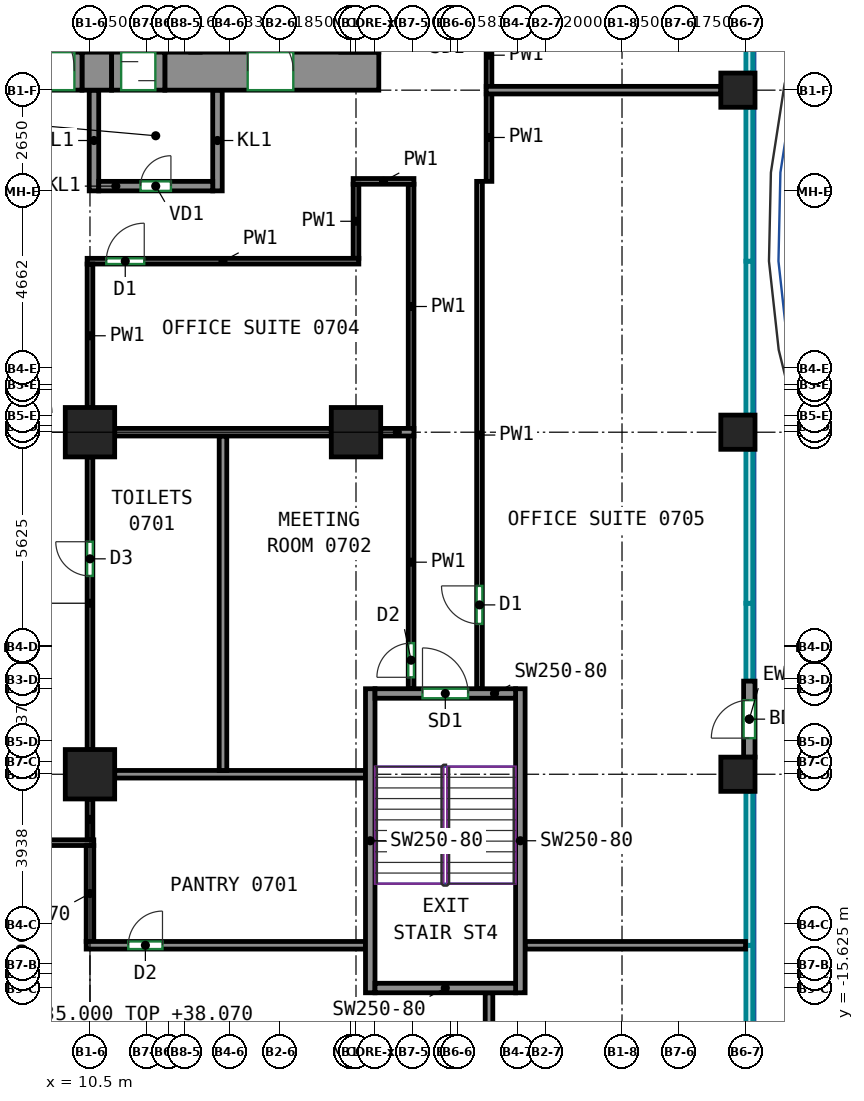
"""IFC4 building model, lengths in metres.
Left out: names, types, materials, properties, quantities, classifications, styles, units other than length and angle.
Written with IfcOpenShell. Run it as: python <this file> out.ifc"""

import sys

from ifc_helpers import new_model, si_unit, direction, frame, frame_2d, origin, origin_2d, place, context, subcontext, project, spatial, rectangle, extrude, source, transform, mapped, element, fill, save


model = new_model("IFC4")
c1 = context("Model", 3, precision=1e-05, world=origin(), true_north=direction((0.0, 1.0)))
c2 = subcontext(c1, "Body", "Model", "MODEL_VIEW")
j1 = project(units=[si_unit("LENGTHUNIT", "METRE"), si_unit("PLANEANGLEUNIT", "RADIAN")], contexts=[c1])
p1 = place(None, origin())
s1 = spatial("IfcSite", under=j1, at=p1, CompositionType="ELEMENT")
p2 = place(p1, origin())
s2 = spatial("IfcBuilding", under=s1, at=p2, CompositionType="ELEMENT")
p3 = place(p2, frame((0.0, 0.0, 35.0)))
s3 = spatial("IfcBuildingStorey", under=s2, at=p3, CompositionType="ELEMENT", Elevation=35.0)
m1 = source(origin(), c2, "Body", "SweptSolid", [
    extrude(rectangle(XDim=1.3, YDim=1.3, at=origin_2d()), origin(), (0.0, 0.0, 1.0), 3.72),
])
for number, where, z_axis, x_axis in (
    (1, (10.5, -10.0, 0.0), (0.0, 0.0, 1.0), (1.0, 0.0, 0.0)),
    (2, (10.5, -1.0, 0.0), (0.0, 0.0, 1.0), (1.0, 0.0, 0.0)),
    (3, (17.5, -1.0, 0.0), (0.0, 0.0, 1.0), (1.0, 0.0, 0.0)),
):
    element("IfcColumn", number, at=place(p3, frame(where, z_axis=z_axis, x_axis=x_axis)), inside=s3, PredefinedType="COLUMN", context=c2, shape_type="MappedRepresentation", body=[
        mapped(m1, transform((0.0, 0.0, 0.0))),
    ])
m2 = source(origin(), c2, "Body", "SweptSolid", [
    extrude(rectangle(XDim=0.9, YDim=0.9, at=origin_2d()), origin(), (0.0, 0.0, 1.0), 3.72),
])
for number, where, z_axis, x_axis in (
    (4, (27.55, -10.0, 0.0), (0.0, 0.0, 1.0), (1.0, 0.0, 0.0)),
    (5, (27.55, -1.0, 0.0), (0.0, 0.0, 1.0), (1.0, 0.0, 0.0)),
    (6, (27.55, 8.0, 0.0), (0.0, 0.0, 1.0), (1.0, 0.0, 0.0)),
):
    element("IfcColumn", number, at=place(p3, frame(where, z_axis=z_axis, x_axis=x_axis)), inside=s3, PredefinedType="COLUMN", context=c2, shape_type="MappedRepresentation", body=[
        mapped(m2, transform((0.0, 0.0, 0.0))),
    ])
m3 = source(origin(), c2, "Body", "SweptSolid", [
    extrude(rectangle(XDim=0.78, YDim=1.0, at=frame_2d((0.39, 0.0))), origin(), (0.0, 0.0, 1.0), 3.72),
])
p4 = place(p3, frame((10.29, 8.5, 0.0), z_axis=(0.0, 0.0, 1.0), x_axis=(1.0, 0.0, 0.0)))
e7 = element("IfcWall", 7, at=p4, inside=s3, PredefinedType="SHEAR", context=c2, shape_type="MappedRepresentation", body=[
    mapped(m3, transform((0.0, 0.0, 0.0))),
])
m4 = source(origin(), c2, "Body", "SweptSolid", [
    extrude(rectangle(XDim=5.63, YDim=1.0, at=frame_2d((2.815, 0.0))), origin(), (0.0, 0.0, 1.0), 3.72),
])
p5 = place(p3, frame((12.47, 8.5, 0.0), z_axis=(0.0, 0.0, 1.0), x_axis=(1.0, 0.0, 0.0)))
e8 = element("IfcWall", 8, at=p5, inside=s3, PredefinedType="SHEAR", context=c2, shape_type="MappedRepresentation", body=[
    mapped(m4, transform((0.0, 0.0, 0.0))),
])
p6 = place(p5, frame((2.18, 0.0, 0.0)))
e9 = element("IfcOpeningElement", 9, at=p6, cuts=e8, PredefinedType="OPENING", context=c2, shape_type="SweptSolid", body=[
    extrude(rectangle(XDim=1.2, YDim=2.1, at=frame_2d((0.6, 1.05))), frame((0.0, 0.51, 0.0), z_axis=(0.0, -1.0, 0.0), x_axis=(1.0, 0.0, 0.0)), (0.0, 0.0, 1.0), 1.02),
])
m5 = source(origin(), c2, "Body", "SweptSolid", [
    extrude(rectangle(XDim=8.0, YDim=0.25, at=frame_2d((4.0, 0.0))), origin(), (0.0, 0.0, 1.0), 3.72),
])
for number, where, z_axis, x_axis in (
    (10, (17.875, -15.75, 0.0), (0.0, 0.0, 1.0), (0.0, 1.0, 0.0)),
    (11, (21.825, -15.75, 0.0), (0.0, 0.0, 1.0), (0.0, 1.0, 0.0)),
):
    element("IfcWall", number, at=place(p3, frame(where, z_axis=z_axis, x_axis=x_axis)), inside=s3, PredefinedType="SHEAR", context=c2, shape_type="MappedRepresentation", body=[
        mapped(m5, transform((0.0, 0.0, 0.0))),
    ])
m6 = source(origin(), c2, "Body", "SweptSolid", [
    extrude(rectangle(XDim=3.7, YDim=0.25, at=frame_2d((1.85, 0.0))), origin(), (0.0, 0.0, 1.0), 3.72),
])
p7 = place(p3, frame((18.0, -15.625, 0.0), z_axis=(0.0, 0.0, 1.0), x_axis=(1.0, 0.0, 0.0)))
e12 = element("IfcWall", 12, at=p7, inside=s3, PredefinedType="SHEAR", context=c2, shape_type="MappedRepresentation", body=[
    mapped(m6, transform((0.0, 0.0, 0.0))),
])
p8 = place(p3, frame((18.0, -7.875, 0.0), z_axis=(0.0, 0.0, 1.0), x_axis=(1.0, 0.0, 0.0)))
e13 = element("IfcWall", 13, at=p8, inside=s3, PredefinedType="SHEAR", context=c2, shape_type="MappedRepresentation", body=[
    mapped(m6, transform((0.0, 0.0, 0.0))),
])
p9 = place(p8, frame((1.25, 0.0, 0.0)))
e14 = element("IfcOpeningElement", 14, at=p9, cuts=e13, PredefinedType="OPENING", context=c2, shape_type="SweptSolid", body=[
    extrude(rectangle(XDim=1.2, YDim=2.1, at=frame_2d((0.6, 1.05))), frame((0.0, 0.135, 0.0), z_axis=(0.0, -1.0, 0.0), x_axis=(1.0, 0.0, 0.0)), (0.0, 0.0, 1.0), 0.27),
])
m7 = source(origin(), c2, "Body", "SweptSolid", [
    extrude(rectangle(XDim=2.0, YDim=0.3, at=frame_2d((1.0, 0.0))), origin(), (0.0, 0.0, 1.0), 3.72),
])
p10 = place(p3, frame((27.85, -9.55, 0.0), z_axis=(0.0, 0.0, 1.0), x_axis=(0.0, 1.0, 0.0)))
e15 = element("IfcWall", 15, at=p10, inside=s3, PredefinedType="SOLIDWALL", context=c2, shape_type="MappedRepresentation", body=[
    mapped(m7, transform((0.0, 0.0, 0.0))),
])
p11 = place(p10, frame((0.5, 0.0, 0.0)))
e16 = element("IfcOpeningElement", 16, at=p11, cuts=e15, PredefinedType="OPENING", context=c2, shape_type="SweptSolid", body=[
    extrude(rectangle(XDim=1.0, YDim=2.1, at=frame_2d((0.5, 1.05))), frame((0.0, 0.16, 0.0), z_axis=(0.0, -1.0, 0.0), x_axis=(1.0, 0.0, 0.0)), (0.0, 0.0, 1.0), 0.32),
])
m8 = source(origin(), c2, "Body", "SweptSolid", [
    extrude(rectangle(XDim=2.65, YDim=0.25, at=frame_2d((1.325, 0.0))), origin(), (0.0, 0.0, 1.0), 3.72),
])
for number, where, z_axis, x_axis in (
    (17, (10.605, 5.35, 0.0), (0.0, 0.0, 1.0), (0.0, 1.0, 0.0)),
    (18, (13.855, 5.35, 0.0), (0.0, 0.0, 1.0), (0.0, 1.0, 0.0)),
):
    element("IfcWall", number, at=place(p3, frame(where, z_axis=z_axis, x_axis=x_axis)), inside=s3, PredefinedType="PARTITIONING", context=c2, shape_type="MappedRepresentation", body=[
        mapped(m8, transform((0.0, 0.0, 0.0))),
    ])
m9 = source(origin(), c2, "Body", "SweptSolid", [
    extrude(rectangle(XDim=3.0, YDim=0.25, at=frame_2d((1.5, 0.0))), origin(), (0.0, 0.0, 1.0), 3.72),
])
p12 = place(p3, frame((10.73, 5.475, 0.0), z_axis=(0.0, 0.0, 1.0), x_axis=(1.0, 0.0, 0.0)))
e19 = element("IfcWall", 19, at=p12, inside=s3, PredefinedType="PARTITIONING", context=c2, shape_type="MappedRepresentation", body=[
    mapped(m9, transform((0.0, 0.0, 0.0))),
])
p13 = place(p12, frame((1.1, 0.0, 0.0)))
e20 = element("IfcOpeningElement", 20, at=p13, cuts=e19, PredefinedType="OPENING", context=c2, shape_type="SweptSolid", body=[
    extrude(rectangle(XDim=0.8, YDim=2.0, at=frame_2d((0.4, 1.0))), frame((0.0, 0.135, 0.0), z_axis=(0.0, -1.0, 0.0), x_axis=(1.0, 0.0, 0.0)), (0.0, 0.0, 1.0), 0.27),
])
m10 = source(origin(), c2, "Body", "SweptSolid", [
    extrude(rectangle(XDim=2.4, YDim=1.0, at=frame_2d((1.2, 0.0))), origin(), (0.0, 0.0, 1.0), 2.7),
])
p14 = place(p3, frame((7.89, 8.5, 0.0), z_axis=(0.0, 0.0, 1.0), x_axis=(1.0, 0.0, 0.0)))
e21 = element("IfcWall", 21, at=p14, inside=s3, PredefinedType="PARTITIONING", context=c2, shape_type="MappedRepresentation", body=[
    mapped(m10, transform((0.0, 0.0, 0.0))),
])
p15 = place(p14, frame((0.2, 0.0, 0.0)))
e22 = element("IfcOpeningElement", 22, at=p15, cuts=e21, PredefinedType="OPENING", context=c2, shape_type="SweptSolid", body=[
    extrude(rectangle(XDim=2.0, YDim=2.1, at=frame_2d((1.0, 1.05))), frame((0.0, 0.51, 0.0), z_axis=(0.0, -1.0, 0.0), x_axis=(1.0, 0.0, 0.0)), (0.0, 0.0, 1.0), 1.02),
])
m11 = source(origin(), c2, "Body", "SweptSolid", [
    extrude(rectangle(XDim=1.4, YDim=1.0, at=frame_2d((0.7, 0.0))), origin(), (0.0, 0.0, 1.0), 2.7),
])
p16 = place(p3, frame((11.07, 8.5, 0.0), z_axis=(0.0, 0.0, 1.0), x_axis=(1.0, 0.0, 0.0)))
e23 = element("IfcWall", 23, at=p16, inside=s3, PredefinedType="PARTITIONING", context=c2, shape_type="MappedRepresentation", body=[
    mapped(m11, transform((0.0, 0.0, 0.0))),
])
p17 = place(p16, frame((0.25, 0.0, 0.0)))
e24 = element("IfcOpeningElement", 24, at=p17, cuts=e23, PredefinedType="OPENING", context=c2, shape_type="SweptSolid", body=[
    extrude(rectangle(XDim=0.9, YDim=2.1, at=frame_2d((0.45, 1.05))), frame((0.0, 0.51, 0.0), z_axis=(0.0, -1.0, 0.0), x_axis=(1.0, 0.0, 0.0)), (0.0, 0.0, 1.0), 1.02),
])
p18 = place(p3, frame((-10.575, -11.8, 0.0), z_axis=(0.0, 0.0, 1.0), x_axis=(1.0, 0.0, 0.0)))
e25 = element("IfcWall", 25, at=p18, inside=s3, PredefinedType="PARTITIONING", context=c2, shape_type="SweptSolid", body=[
    extrude(rectangle(XDim=21.175, YDim=0.15, at=frame_2d((10.587, 0.0))), origin(), (0.0, 0.0, 1.0), 3.72),
])
p19 = place(p18, frame((2.018, 0.0, 0.0)))
e26 = element("IfcOpeningElement", 26, at=p19, cuts=e25, PredefinedType="OPENING", context=c2, shape_type="SweptSolid", body=[
    extrude(rectangle(XDim=1.8, YDim=2.1, at=frame_2d((0.9, 1.05))), frame((0.0, 0.085, 0.0), z_axis=(0.0, -1.0, 0.0), x_axis=(1.0, 0.0, 0.0)), (0.0, 0.0, 1.0), 0.17),
])
p20 = place(p18, frame((12.467, 0.0, 0.0)))
e27 = element("IfcOpeningElement", 27, at=p20, cuts=e25, PredefinedType="OPENING", context=c2, shape_type="SweptSolid", body=[
    extrude(rectangle(XDim=0.9, YDim=2.1, at=frame_2d((0.45, 1.05))), frame((0.0, 0.085, 0.0), z_axis=(0.0, -1.0, 0.0), x_axis=(1.0, 0.0, 0.0)), (0.0, 0.0, 1.0), 0.17),
])
p21 = place(p3, frame((10.5, -11.725, 0.0), z_axis=(0.0, 0.0, 1.0), x_axis=(0.0, 1.0, 0.0)))
e28 = element("IfcWall", 28, at=p21, inside=s3, PredefinedType="PARTITIONING", context=c2, shape_type="SweptSolid", body=[
    extrude(rectangle(XDim=1.075, YDim=0.15, at=frame_2d((0.538, 0.0))), origin(), (0.0, 0.0, 1.0), 3.07),
])
p22 = place(p3, frame((10.5, -9.35, 0.0), z_axis=(0.0, 0.0, 1.0), x_axis=(0.0, 1.0, 0.0)))
e29 = element("IfcWall", 29, at=p22, inside=s3, PredefinedType="PARTITIONING", context=c2, shape_type="SweptSolid", body=[
    extrude(rectangle(XDim=7.7, YDim=0.15, at=frame_2d((3.85, 0.0))), origin(), (0.0, 0.0, 1.0), 3.07),
])
p23 = place(p22, frame((4.568, 0.0, 0.0)))
e30 = element("IfcOpeningElement", 30, at=p23, cuts=e29, PredefinedType="OPENING", context=c2, shape_type="SweptSolid", body=[
    extrude(rectangle(XDim=0.9, YDim=2.1, at=frame_2d((0.45, 1.05))), frame((0.0, 0.085, 0.0), z_axis=(0.0, -1.0, 0.0), x_axis=(1.0, 0.0, 0.0)), (0.0, 0.0, 1.0), 0.17),
])
p24 = place(p3, frame((18.95, -7.75, 0.0), z_axis=(0.0, 0.0, 1.0), x_axis=(0.0, 1.0, 0.0)))
e31 = element("IfcWall", 31, at=p24, inside=s3, PredefinedType="PARTITIONING", context=c2, shape_type="SweptSolid", body=[
    extrude(rectangle(XDim=6.66, YDim=0.15, at=frame_2d((3.33, 0.0))), origin(), (0.0, 0.0, 1.0), 3.72),
])
p25 = place(p24, frame((0.301, 0.0, 0.0)))
e32 = element("IfcOpeningElement", 32, at=p25, cuts=e31, PredefinedType="OPENING", context=c2, shape_type="SweptSolid", body=[
    extrude(rectangle(XDim=0.9, YDim=2.1, at=frame_2d((0.45, 1.05))), frame((0.0, 0.085, 0.0), z_axis=(0.0, -1.0, 0.0), x_axis=(1.0, 0.0, 0.0)), (0.0, 0.0, 1.0), 0.17),
])
p26 = place(p3, frame((18.95, -0.91, 0.0), z_axis=(0.0, 0.0, 1.0), x_axis=(0.0, 1.0, 0.0)))
e33 = element("IfcWall", 33, at=p26, inside=s3, PredefinedType="PARTITIONING", context=c2, shape_type="SweptSolid", body=[
    extrude(rectangle(XDim=6.435, YDim=0.15, at=frame_2d((3.217, 0.0))), origin(), (0.0, 0.0, 1.0), 3.72),
])
p27 = place(p3, frame((17.425, 5.6, 0.0), z_axis=(0.0, 0.0, 1.0), x_axis=(1.0, 0.0, 0.0)))
e34 = element("IfcWall", 34, at=p27, inside=s3, PredefinedType="PARTITIONING", context=c2, shape_type="SweptSolid", body=[
    extrude(rectangle(XDim=1.6, YDim=0.15, at=frame_2d((0.8, 0.0))), origin(), (0.0, 0.0, 1.0), 3.72),
])
p28 = place(p3, frame((17.5, 3.575, 0.0), z_axis=(0.0, 0.0, 1.0), x_axis=(0.0, 1.0, 0.0)))
e35 = element("IfcWall", 35, at=p28, inside=s3, PredefinedType="PARTITIONING", context=c2, shape_type="SweptSolid", body=[
    extrude(rectangle(XDim=1.95, YDim=0.15, at=frame_2d((0.975, 0.0))), origin(), (0.0, 0.0, 1.0), 3.72),
])
p29 = place(p3, frame((10.425, 3.5, 0.0), z_axis=(0.0, 0.0, 1.0), x_axis=(1.0, 0.0, 0.0)))
e36 = element("IfcWall", 36, at=p29, inside=s3, PredefinedType="PARTITIONING", context=c2, shape_type="SweptSolid", body=[
    extrude(rectangle(XDim=7.15, YDim=0.15, at=frame_2d((3.575, 0.0))), origin(), (0.0, 0.0, 1.0), 3.72),
])
p30 = place(p29, frame((0.503, 0.0, 0.0)))
e37 = element("IfcOpeningElement", 37, at=p30, cuts=e36, PredefinedType="OPENING", context=c2, shape_type="SweptSolid", body=[
    extrude(rectangle(XDim=1.0, YDim=2.1, at=frame_2d((0.5, 1.05))), frame((0.0, 0.085, 0.0), z_axis=(0.0, -1.0, 0.0), x_axis=(1.0, 0.0, 0.0)), (0.0, 0.0, 1.0), 0.17),
])
p31 = place(p3, frame((10.5, -0.35, 0.0), z_axis=(0.0, 0.0, 1.0), x_axis=(0.0, 1.0, 0.0)))
e38 = element("IfcWall", 38, at=p31, inside=s3, PredefinedType="PARTITIONING", context=c2, shape_type="SweptSolid", body=[
    extrude(rectangle(XDim=3.775, YDim=0.15, at=frame_2d((1.888, 0.0))), origin(), (0.0, 0.0, 1.0), 3.72),
])
p32 = place(p3, frame((21.0, 5.6, 0.0), z_axis=(0.0, 0.0, 1.0), x_axis=(0.0, 1.0, 0.0)))
e39 = element("IfcWall", 39, at=p32, inside=s3, PredefinedType="PARTITIONING", context=c2, shape_type="SweptSolid", body=[
    extrude(rectangle(XDim=2.31, YDim=0.15, at=frame_2d((1.155, 0.0))), origin(), (0.0, 0.0, 1.0), 3.72),
])
p33 = place(p3, frame((20.75, -7.75, 0.0), z_axis=(0.0, 0.0, 1.0), x_axis=(0.0, 1.0, 0.0)))
e40 = element("IfcWall", 40, at=p33, inside=s3, PredefinedType="PARTITIONING", context=c2, shape_type="SweptSolid", body=[
    extrude(rectangle(XDim=13.35, YDim=0.15, at=frame_2d((6.675, 0.0))), origin(), (0.0, 0.0, 1.0), 3.72),
])
p34 = place(p33, frame((1.706, 0.0, 0.0)))
e41 = element("IfcOpeningElement", 41, at=p34, cuts=e40, PredefinedType="OPENING", context=c2, shape_type="SweptSolid", body=[
    extrude(rectangle(XDim=1.0, YDim=2.1, at=frame_2d((0.5, 1.05))), frame((0.0, 0.085, 0.0), z_axis=(0.0, -1.0, 0.0), x_axis=(1.0, 0.0, 0.0)), (0.0, 0.0, 1.0), 0.17),
])
p35 = place(p3, frame((21.0, 8.09, 0.0), z_axis=(0.0, 0.0, 1.0), x_axis=(0.0, 1.0, 0.0)))
e42 = element("IfcWall", 42, at=p35, inside=s3, PredefinedType="PARTITIONING", context=c2, shape_type="SweptSolid", body=[
    extrude(rectangle(XDim=1.66, YDim=0.15, at=frame_2d((0.83, 0.0))), origin(), (0.0, 0.0, 1.0), 3.72),
])
p36 = place(p3, frame((21.0, -15.75, 0.0), z_axis=(0.0, 0.0, 1.0), x_axis=(0.0, -1.0, 0.0)))
e43 = element("IfcWall", 43, at=p36, inside=s3, PredefinedType="PARTITIONING", context=c2, shape_type="SweptSolid", body=[
    extrude(rectangle(XDim=3.15, YDim=0.2, at=frame_2d((1.575, 0.0))), origin(), (0.0, 0.0, 1.0), 3.72),
])
p37 = place(p3, frame((21.95, -14.5, 0.0), z_axis=(0.0, 0.0, 1.0), x_axis=(1.0, 0.0, 0.0)))
e44 = element("IfcWall", 44, at=p37, inside=s3, PredefinedType="PARTITIONING", context=c2, shape_type="SweptSolid", body=[
    extrude(rectangle(XDim=5.8, YDim=0.2, at=frame_2d((2.9, 0.0))), origin(), (0.0, 0.0, 1.0), 3.72),
])
p38 = place(p3, frame((10.5, -14.4, 0.0), z_axis=(0.0, 0.0, 1.0), x_axis=(0.0, 1.0, 0.0)))
e45 = element("IfcWall", 45, at=p38, inside=s3, PredefinedType="PARTITIONING", context=c2, shape_type="SweptSolid", body=[
    extrude(rectangle(XDim=2.524, YDim=0.2, at=frame_2d((1.262, 0.0))), origin(), (0.0, 0.0, 1.0), 3.07),
])
p39 = place(p3, frame((10.4, -14.5, 0.0), z_axis=(0.0, 0.0, 1.0), x_axis=(1.0, 0.0, 0.0)))
e46 = element("IfcWall", 46, at=p39, inside=s3, PredefinedType="PARTITIONING", context=c2, shape_type="SweptSolid", body=[
    extrude(rectangle(XDim=7.35, YDim=0.2, at=frame_2d((3.675, 0.0))), origin(), (0.0, 0.0, 1.0), 3.72),
])
p40 = place(p39, frame((1.108, 0.0, 0.0)))
e47 = element("IfcOpeningElement", 47, at=p40, cuts=e46, PredefinedType="OPENING", context=c2, shape_type="SweptSolid", body=[
    extrude(rectangle(XDim=0.9, YDim=2.1, at=frame_2d((0.45, 1.05))), frame((0.0, 0.11, 0.0), z_axis=(0.0, -1.0, 0.0), x_axis=(1.0, 0.0, 0.0)), (0.0, 0.0, 1.0), 0.22),
])
p41 = place(p3, frame((11.15, -10.0, 0.0), z_axis=(0.0, 0.0, 1.0), x_axis=(1.0, 0.0, 0.0)))
e48 = element("IfcWall", 48, at=p41, inside=s3, PredefinedType="PARTITIONING", context=c2, shape_type="SweptSolid", body=[
    extrude(rectangle(XDim=6.6, YDim=0.2, at=frame_2d((3.3, 0.0))), origin(), (0.0, 0.0, 1.0), 3.72),
])
p42 = place(p3, frame((14.0, -9.9, 0.0), z_axis=(0.0, 0.0, 1.0), x_axis=(0.0, 1.0, 0.0)))
e49 = element("IfcWall", 49, at=p42, inside=s3, PredefinedType="PARTITIONING", context=c2, shape_type="SweptSolid", body=[
    extrude(rectangle(XDim=8.8, YDim=0.2, at=frame_2d((4.4, 0.0))), origin(), (0.0, 0.0, 1.0), 3.72),
])
p43 = place(p3, frame((11.15, -1.0, 0.0), z_axis=(0.0, 0.0, 1.0), x_axis=(1.0, 0.0, 0.0)))
e50 = element("IfcWall", 50, at=p43, inside=s3, PredefinedType="PARTITIONING", context=c2, shape_type="SweptSolid", body=[
    extrude(rectangle(XDim=5.7, YDim=0.2, at=frame_2d((2.85, 0.0))), origin(), (0.0, 0.0, 1.0), 3.72),
])
p44 = place(p3, frame((18.15, -1.0, 0.0), z_axis=(0.0, 0.0, 1.0), x_axis=(1.0, 0.0, 0.0)))
e51 = element("IfcWall", 51, at=p44, inside=s3, PredefinedType="PARTITIONING", context=c2, shape_type="SweptSolid", body=[
    extrude(rectangle(XDim=0.874, YDim=0.2, at=frame_2d((0.437, 0.0))), origin(), (0.0, 0.0, 1.0), 3.07),
])
p45 = place(p3, frame((20.926, 8.0, 0.0), z_axis=(0.0, 0.0, 1.0), x_axis=(1.0, 0.0, 0.0)))
e52 = element("IfcWall", 52, at=p45, inside=s3, PredefinedType="PARTITIONING", context=c2, shape_type="SweptSolid", body=[
    extrude(rectangle(XDim=6.174, YDim=0.2, at=frame_2d((3.087, 0.0))), origin(), (0.0, 0.0, 1.0), 3.72),
])
p46 = place(p11, origin())
e53 = element("IfcDoor", 53, at=p46, inside=s3, OperationType="SINGLE_SWING_LEFT", PredefinedType="DOOR", context=c2, shape_type="SweptSolid", body=[
    extrude(rectangle(XDim=1.0, YDim=2.1, at=frame_2d((0.5, 1.05))), frame((0.0, 0.025, 0.0), z_axis=(0.0, -1.0, 0.0), x_axis=(1.0, 0.0, 0.0)), (0.0, 0.0, 1.0), 0.05),
])
fill(e16, e53)
p47 = place(p15, origin())
e54 = element("IfcDoor", 54, at=p47, inside=s3, OperationType="DOUBLE_DOOR_SINGLE_SWING", PredefinedType="DOOR", context=c2, shape_type="SweptSolid", body=[
    extrude(rectangle(XDim=2.0, YDim=2.1, at=frame_2d((1.0, 1.05))), frame((0.0, 0.405, 0.0), z_axis=(0.0, -1.0, 0.0), x_axis=(1.0, 0.0, 0.0)), (0.0, 0.0, 1.0), 0.05),
])
fill(e22, e54)
p48 = place(p13, origin())
e55 = element("IfcDoor", 55, at=p48, inside=s3, OperationType="SINGLE_SWING_RIGHT", PredefinedType="DOOR", context=c2, shape_type="SweptSolid", body=[
    extrude(rectangle(XDim=0.8, YDim=2.0, at=frame_2d((0.4, 1.0))), frame((0.0, 0.025, 0.0), z_axis=(0.0, -1.0, 0.0), x_axis=(1.0, 0.0, 0.0)), (0.0, 0.0, 1.0), 0.05),
])
fill(e20, e55)
p49 = place(p17, origin())
e56 = element("IfcDoor", 56, at=p49, inside=s3, OperationType="SLIDING_TO_LEFT", PredefinedType="DOOR", context=c2, shape_type="SweptSolid", body=[
    extrude(rectangle(XDim=0.9, YDim=2.1, at=frame_2d((0.45, 1.05))), frame((0.0, 0.405, 0.0), z_axis=(0.0, -1.0, 0.0), x_axis=(1.0, 0.0, 0.0)), (0.0, 0.0, 1.0), 0.05),
])
fill(e24, e56)
p50 = place(p6, origin())
e57 = element("IfcDoor", 57, at=p50, inside=s3, OperationType="DOUBLE_DOOR_SINGLE_SWING", PredefinedType="DOOR", context=c2, shape_type="SweptSolid", body=[
    extrude(rectangle(XDim=1.2, YDim=2.1, at=frame_2d((0.6, 1.05))), frame((0.0, 0.405, 0.0), z_axis=(0.0, -1.0, 0.0), x_axis=(1.0, 0.0, 0.0)), (0.0, 0.0, 1.0), 0.05),
])
fill(e9, e57)
p51 = place(p9, origin())
e58 = element("IfcDoor", 58, at=p51, inside=s3, OperationType="DOUBLE_DOOR_SINGLE_SWING", PredefinedType="DOOR", context=c2, shape_type="SweptSolid", body=[
    extrude(rectangle(XDim=1.2, YDim=2.1, at=frame_2d((0.6, 1.05))), frame((0.0, 0.025, 0.0), z_axis=(0.0, -1.0, 0.0), x_axis=(1.0, 0.0, 0.0)), (0.0, 0.0, 1.0), 0.05),
])
fill(e14, e58)
p52 = place(p40, origin())
e59 = element("IfcDoor", 59, at=p52, inside=s3, OperationType="SINGLE_SWING_RIGHT", PredefinedType="DOOR", context=c2, shape_type="SweptSolid", body=[
    extrude(rectangle(XDim=0.9, YDim=2.1, at=frame_2d((0.45, 1.05))), frame((0.0, 0.025, 0.0), z_axis=(0.0, -1.0, 0.0), x_axis=(1.0, 0.0, 0.0)), (0.0, 0.0, 1.0), 0.05),
])
fill(e47, e59)
p53 = place(p25, origin())
e60 = element("IfcDoor", 60, at=p53, inside=s3, OperationType="SINGLE_SWING_LEFT", PredefinedType="DOOR", context=c2, shape_type="SweptSolid", body=[
    extrude(rectangle(XDim=0.9, YDim=2.1, at=frame_2d((0.45, 1.05))), frame((0.0, 0.025, 0.0), z_axis=(0.0, -1.0, 0.0), x_axis=(1.0, 0.0, 0.0)), (0.0, 0.0, 1.0), 0.05),
])
fill(e32, e60)
p54 = place(p34, origin())
e61 = element("IfcDoor", 61, at=p54, inside=s3, OperationType="SINGLE_SWING_RIGHT", PredefinedType="DOOR", context=c2, shape_type="SweptSolid", body=[
    extrude(rectangle(XDim=1.0, YDim=2.1, at=frame_2d((0.5, 1.05))), frame((0.0, 0.025, 0.0), z_axis=(0.0, -1.0, 0.0), x_axis=(1.0, 0.0, 0.0)), (0.0, 0.0, 1.0), 0.05),
])
fill(e41, e61)
p55 = place(p23, origin())
e62 = element("IfcDoor", 62, at=p55, inside=s3, OperationType="SINGLE_SWING_RIGHT", PredefinedType="DOOR", context=c2, shape_type="SweptSolid", body=[
    extrude(rectangle(XDim=0.9, YDim=2.1, at=frame_2d((0.45, 1.05))), frame((0.0, 0.025, 0.0), z_axis=(0.0, -1.0, 0.0), x_axis=(1.0, 0.0, 0.0)), (0.0, 0.0, 1.0), 0.05),
])
fill(e30, e62)
p56 = place(p30, origin())
e63 = element("IfcDoor", 63, at=p56, inside=s3, OperationType="SINGLE_SWING_RIGHT", PredefinedType="DOOR", context=c2, shape_type="SweptSolid", body=[
    extrude(rectangle(XDim=1.0, YDim=2.1, at=frame_2d((0.5, 1.05))), frame((0.0, 0.025, 0.0), z_axis=(0.0, -1.0, 0.0), x_axis=(1.0, 0.0, 0.0)), (0.0, 0.0, 1.0), 0.05),
])
fill(e37, e63)
save(model, sys.argv[1])
